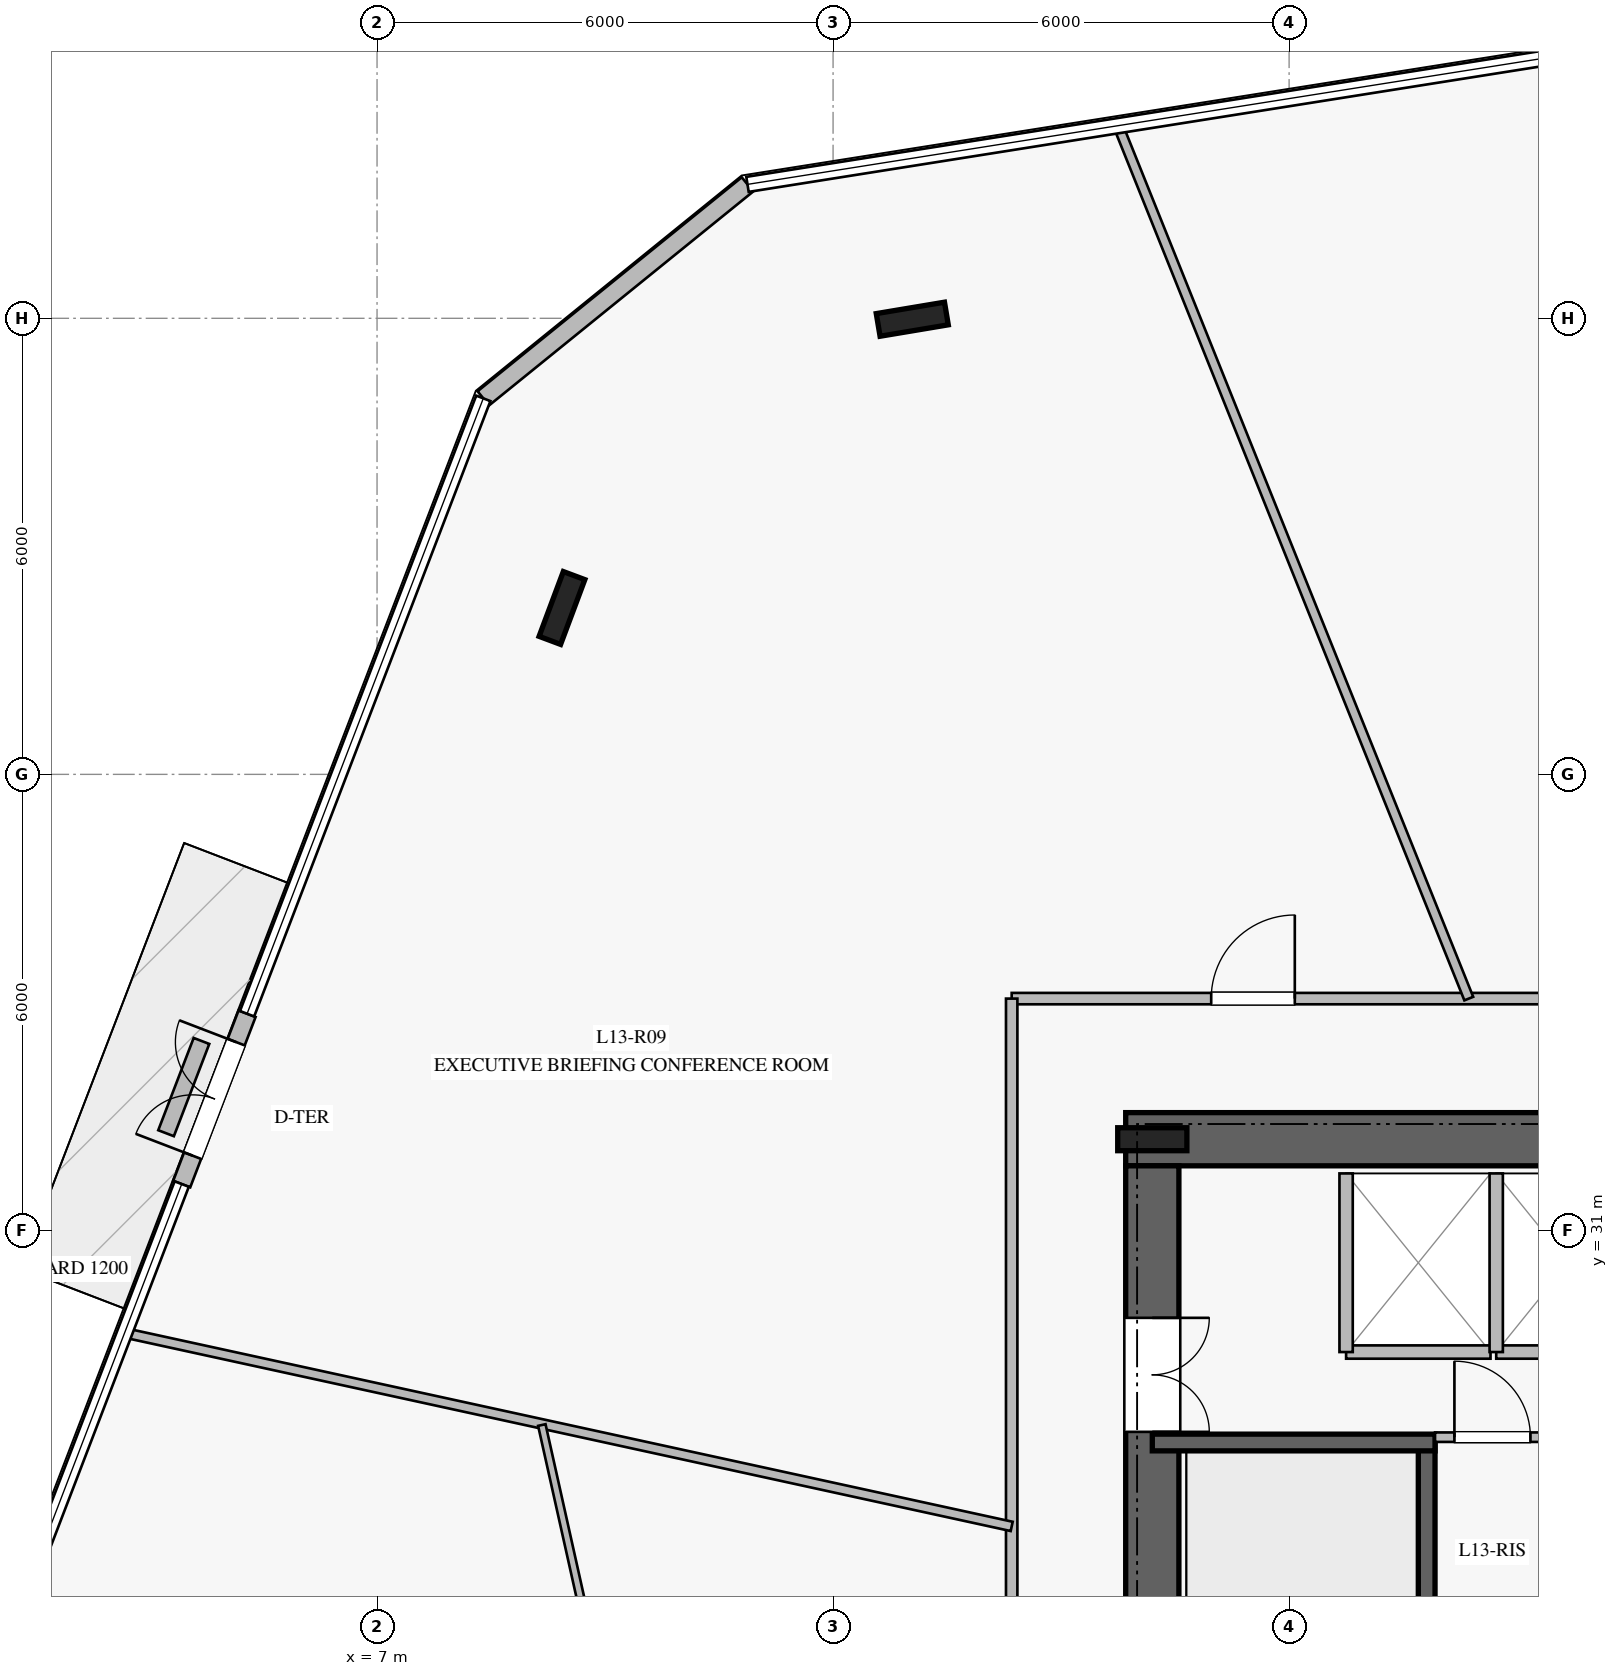
"""IFC4 building model, lengths in metres.
Left out: names, types, materials, properties, quantities, classifications, styles, units other than length and angle.
Written with IfcOpenShell. Run it as: python <this file> out.ifc"""

import sys

from ifc_helpers import new_model, si_unit, direction, frame, frame_2d, origin, origin_2d, place, context, subcontext, project, spatial, rectangle, i_section, extrude, element, fill, save


model = new_model("IFC4")
c1 = context("Model", 3, precision=1e-05, world=origin(), true_north=direction((0.0, 1.0)))
c2 = subcontext(c1, "Body", "Model", "MODEL_VIEW")
j1 = project(units=[si_unit("LENGTHUNIT", "METRE"), si_unit("PLANEANGLEUNIT", "RADIAN")], contexts=[c1])
p1 = place(None, origin())
s1 = spatial("IfcSite", under=j1, at=p1, CompositionType="ELEMENT")
p2 = place(p1, origin())
s2 = spatial("IfcBuilding", under=s1, at=p2, CompositionType="ELEMENT")
p3 = place(p2, frame((0.0, 0.0, 56.0)))
s3 = spatial("IfcBuildingStorey", under=s2, at=p3, CompositionType="ELEMENT", Elevation=56.0)
p4 = place(p3, frame((33.15, 32.2, 0.0), z_axis=(0.0, 0.0, 1.0), x_axis=(-1.0, 0.0, 0.0)))
e1 = element("IfcWall", 1, at=p4, inside=s3, PredefinedType="SHEAR", context=c2, shape_type="SweptSolid", body=[
    extrude(rectangle(XDim=16.3, YDim=0.7, at=frame_2d((8.15, 0.0))), origin(), (0.0, 0.0, 1.0), 3.76),
])
p5 = place(p4, frame((5.1, 0.0, 0.0)))
e2 = element("IfcOpeningElement", 2, at=p5, cuts=e1, PredefinedType="OPENING", context=c2, shape_type="SweptSolid", body=[
    extrude(rectangle(XDim=1.2, YDim=2.25, at=frame_2d((0.6, 1.125))), frame((0.0, 0.36, 0.0), z_axis=(0.0, -1.0, 0.0), x_axis=(1.0, 0.0, 0.0)), (0.0, 0.0, 1.0), 0.72),
])
p6 = place(p3, frame((17.2, 31.85, 0.0), z_axis=(0.0, 0.0, 1.0), x_axis=(0.0, -1.0, 0.0)))
e3 = element("IfcWall", 3, at=p6, inside=s3, PredefinedType="SHEAR", context=c2, shape_type="SweptSolid", body=[
    extrude(rectangle(XDim=13.7, YDim=0.7, at=frame_2d((6.85, 0.0))), origin(), (0.0, 0.0, 1.0), 3.76),
])
p7 = place(p6, frame((2.0, 0.0, 0.0)))
e4 = element("IfcOpeningElement", 4, at=p7, cuts=e3, PredefinedType="OPENING", context=c2, shape_type="SweptSolid", body=[
    extrude(rectangle(XDim=1.5, YDim=2.2, at=frame_2d((0.75, 1.1))), frame((0.0, 0.36, 0.0), z_axis=(0.0, -1.0, 0.0), x_axis=(1.0, 0.0, 0.0)), (0.0, 0.0, 1.0), 0.72),
])
p8 = place(p3, frame((17.2, 32.2, 0.0), z_axis=(0.0, 0.0, 1.0), x_axis=(1.0, 0.0, 0.0)))
e5 = element("IfcColumn", 5, at=p8, inside=s3, PredefinedType="COLUMN", context=c2, shape_type="SweptSolid", body=[
    extrude(i_section(OverallWidth=0.302, OverallDepth=0.91, WebThickness=0.021, FlangeThickness=0.04, at=origin_2d()), origin(), (0.0, 0.0, 1.0), 4.0),
])
p9 = place(p3, frame((20.81, 20.99, 0.0), z_axis=(0.0, 0.0, 1.0), x_axis=(0.0, 1.0, 0.0)))
e6 = element("IfcWall", 6, at=p9, inside=s3, PredefinedType="SOLIDWALL", context=c2, shape_type="SweptSolid", body=[
    extrude(rectangle(XDim=7.22, YDim=0.22, at=frame_2d((3.61, 0.0))), origin(), (0.0, 0.0, 1.0), 3.76),
])
p10 = place(p9, frame((0.18, 0.0, 0.0)))
e7 = element("IfcOpeningElement", 7, at=p10, cuts=e6, PredefinedType="OPENING", context=c2, shape_type="SweptSolid", body=[
    extrude(rectangle(XDim=1.15, YDim=2.2, at=frame_2d((0.575, 1.1))), frame((0.0, 0.12, 0.0), z_axis=(0.0, -1.0, 0.0), x_axis=(1.0, 0.0, 0.0)), (0.0, 0.0, 1.0), 0.24),
])
p11 = place(p3, frame((17.2, 28.21, 0.0), z_axis=(0.0, 0.0, 1.0), x_axis=(1.0, 0.0, 0.0)))
e8 = element("IfcWall", 8, at=p11, inside=s3, PredefinedType="SOLIDWALL", context=c2, shape_type="SweptSolid", body=[
    extrude(rectangle(XDim=3.72, YDim=0.22, at=frame_2d((1.86, 0.0))), origin(), (0.0, 0.0, 1.0), 3.76),
])
for number, where, z_axis, x_axis in (
    (9, (14.042, 42.988, 0.0), (0.0, 0.0, 1.0), (0.986, 0.165, 0.0)),
    (10, (9.433, 39.189, 0.0), (0.0, 0.0, 1.0), (0.35, 0.937, 0.0)),
):
    element("IfcColumn", number, at=place(p3, frame(where, z_axis=z_axis, x_axis=x_axis)), inside=s3, PredefinedType="COLUMN", context=c2, shape_type="SweptSolid", body=[
        extrude(i_section(OverallWidth=0.302, OverallDepth=0.91, WebThickness=0.021, FlangeThickness=0.04, at=origin_2d()), origin(), (0.0, 0.0, 1.0), 4.0),
    ])
p12 = place(p3, frame((11.874, 44.762, 0.0), z_axis=(0.0, 0.0, 1.0), x_axis=(-0.777138088211, -0.629330113574, 0.0)))
e11 = element("IfcWall", 11, at=p12, inside=s3, PredefinedType="STANDARD", context=c2, shape_type="SweptSolid", body=[
    extrude(rectangle(XDim=4.473, YDim=0.24, at=frame_2d((2.236, 0.0))), origin(), (0.0, 0.0, 1.0), 3.76),
])
p13 = place(p3, frame((5.29, 33.851, 0.0), z_axis=(0.0, 0.0, 1.0), x_axis=(-0.35832469106, -0.933597030724, 0.0)))
e12 = element("IfcWall", 12, at=p13, inside=s3, PredefinedType="STANDARD", context=c2, shape_type="SweptSolid", body=[
    extrude(rectangle(XDim=2.4, YDim=0.24, at=frame_2d((1.2, 0.0))), origin(), (0.0, 0.0, 1.0), 3.76),
])
p14 = place(p13, frame((0.4, 0.0, 0.0)))
e13 = element("IfcOpeningElement", 13, at=p14, cuts=e12, PredefinedType="OPENING", context=c2, shape_type="SweptSolid", body=[
    extrude(rectangle(XDim=1.6, YDim=2.25, at=frame_2d((0.8, 1.125))), frame((0.0, 0.13, 0.0), z_axis=(0.0, -1.0, 0.0), x_axis=(1.0, 0.0, 0.0)), (0.0, 0.0, 1.0), 0.26),
])
p15 = place(p3, frame((4.69, 33.493, 0.0), z_axis=(0.0, 0.0, 1.0), x_axis=(-0.358274337513, -0.933616355405, 0.0)))
e14 = element("IfcWall", 14, at=p15, inside=s3, PredefinedType="USERDEFINED", context=c2, shape_type="SweptSolid", body=[
    extrude(rectangle(XDim=1.3, YDim=0.22, at=frame_2d((0.65, 0.0))), origin(), (0.0, 0.0, 1.0), 0.4),
])
p16 = place(p3, frame((20.92, 28.28, 0.0), z_axis=(0.0, 0.0, 1.0), x_axis=(1.0, 0.0, 0.0)))
e15 = element("IfcWall", 15, at=p16, inside=s3, PredefinedType="PARTITIONING", context=c2, shape_type="SweptSolid", body=[
    extrude(rectangle(XDim=3.405, YDim=0.125, at=frame_2d((1.703, 0.0))), origin(), (0.0, 0.0, 1.0), 3.76),
])
p17 = place(p16, frame((0.255, 0.0, 0.0)))
e16 = element("IfcOpeningElement", 16, at=p17, cuts=e15, PredefinedType="OPENING", context=c2, shape_type="SweptSolid", body=[
    extrude(rectangle(XDim=1.0, YDim=2.15, at=frame_2d((0.5, 1.075))), frame((0.0, 0.073, 0.0), z_axis=(0.0, -1.0, 0.0), x_axis=(1.0, 0.0, 0.0)), (0.0, 0.0, 1.0), 0.145),
])
p18 = place(p3, frame((19.75, 29.4, 0.0), z_axis=(0.0, 0.0, 1.0), x_axis=(1.0, 0.0, 0.0)))
e17 = element("IfcWall", 17, at=p18, inside=s3, PredefinedType="PARTITIONING", context=c2, shape_type="SweptSolid", body=[
    extrude(rectangle(XDim=1.9, YDim=0.175, at=frame_2d((0.95, 0.0))), origin(), (0.0, 0.0, 1.0), 3.76),
])
p19 = place(p3, frame((19.75, 29.4, 0.0), z_axis=(0.0, 0.0, 1.0), x_axis=(0.0, 1.0, 0.0)))
e18 = element("IfcWall", 18, at=p19, inside=s3, PredefinedType="PARTITIONING", context=c2, shape_type="SweptSolid", body=[
    extrude(rectangle(XDim=2.35, YDim=0.175, at=frame_2d((1.175, 0.0))), origin(), (0.0, 0.0, 1.0), 3.76),
])
p20 = place(p3, frame((21.725, 29.4, 0.0), z_axis=(0.0, 0.0, 1.0), x_axis=(1.0, 0.0, 0.0)))
e19 = element("IfcWall", 19, at=p20, inside=s3, PredefinedType="PARTITIONING", context=c2, shape_type="SweptSolid", body=[
    extrude(rectangle(XDim=1.9, YDim=0.175, at=frame_2d((0.95, 0.0))), origin(), (0.0, 0.0, 1.0), 3.76),
])
p21 = place(p3, frame((21.725, 29.4, 0.0), z_axis=(0.0, 0.0, 1.0), x_axis=(0.0, 1.0, 0.0)))
e20 = element("IfcWall", 20, at=p21, inside=s3, PredefinedType="PARTITIONING", context=c2, shape_type="SweptSolid", body=[
    extrude(rectangle(XDim=2.35, YDim=0.175, at=frame_2d((1.175, 0.0))), origin(), (0.0, 0.0, 1.0), 3.76),
])
p22 = place(p3, frame((15.35, 34.05, 0.0), z_axis=(0.0, 0.0, 1.0), x_axis=(1.0, 0.0, 0.0)))
e21 = element("IfcWall", 21, at=p22, inside=s3, PredefinedType="PARTITIONING", context=c2, shape_type="SweptSolid", body=[
    extrude(rectangle(XDim=19.3, YDim=0.15, at=frame_2d((9.65, 0.0))), origin(), (0.0, 0.0, 1.0), 3.21),
])
p23 = place(p22, frame((15.92, 0.0, 0.0)))
e22 = element("IfcOpeningElement", 22, at=p23, cuts=e21, PredefinedType="OPENING", context=c2, shape_type="SweptSolid", body=[
    extrude(rectangle(XDim=1.1, YDim=2.2, at=frame_2d((0.55, 1.1))), frame((0.0, 0.085, 0.0), z_axis=(0.0, -1.0, 0.0), x_axis=(1.0, 0.0, 0.0)), (0.0, 0.0, 1.0), 0.17),
])
p24 = place(p22, frame((9.533, 0.0, 0.0)))
e23 = element("IfcOpeningElement", 23, at=p24, cuts=e21, PredefinedType="OPENING", context=c2, shape_type="SweptSolid", body=[
    extrude(rectangle(XDim=1.1, YDim=2.2, at=frame_2d((0.55, 1.1))), frame((0.0, 0.085, 0.0), z_axis=(0.0, -1.0, 0.0), x_axis=(1.0, 0.0, 0.0)), (0.0, 0.0, 1.0), 0.17),
])
p25 = place(p22, frame((2.625, 0.0, 0.0)))
e24 = element("IfcOpeningElement", 24, at=p25, cuts=e21, PredefinedType="OPENING", context=c2, shape_type="SweptSolid", body=[
    extrude(rectangle(XDim=1.1, YDim=2.2, at=frame_2d((0.55, 1.1))), frame((0.0, 0.085, 0.0), z_axis=(0.0, -1.0, 0.0), x_axis=(1.0, 0.0, 0.0)), (0.0, 0.0, 1.0), 0.17),
])
p26 = place(p3, frame((15.35, 15.95, 0.0), z_axis=(0.0, 0.0, 1.0), x_axis=(0.0, 1.0, 0.0)))
e25 = element("IfcWall", 25, at=p26, inside=s3, PredefinedType="PARTITIONING", context=c2, shape_type="SweptSolid", body=[
    extrude(rectangle(XDim=18.1, YDim=0.15, at=frame_2d((9.05, 0.0))), origin(), (0.0, 0.0, 1.0), 3.21),
])
p27 = place(p26, frame((5.617, 0.0, 0.0)))
e26 = element("IfcOpeningElement", 26, at=p27, cuts=e25, PredefinedType="OPENING", context=c2, shape_type="SweptSolid", body=[
    extrude(rectangle(XDim=1.1, YDim=2.2, at=frame_2d((0.55, 1.1))), frame((0.0, 0.085, 0.0), z_axis=(0.0, -1.0, 0.0), x_axis=(1.0, 0.0, 0.0)), (0.0, 0.0, 1.0), 0.17),
])
p28 = place(p3, frame((21.364, 34.05, 0.0), z_axis=(0.0, 0.0, 1.0), x_axis=(-0.372766267376, 0.927925271725, 0.0)))
e27 = element("IfcWall", 27, at=p28, inside=s3, PredefinedType="PARTITIONING", context=c2, shape_type="SweptSolid", body=[
    extrude(rectangle(XDim=12.359, YDim=0.125, at=frame_2d((6.179, 0.0))), origin(), (0.0, 0.0, 1.0), 3.05),
])
p29 = place(p3, frame((15.35, 27.106, 0.0), z_axis=(0.0, 0.0, 1.0), x_axis=(-0.977011110965, 0.213188388642, 0.0)))
e28 = element("IfcWall", 28, at=p29, inside=s3, PredefinedType="PARTITIONING", context=c2, shape_type="SweptSolid", body=[
    extrude(rectangle(XDim=11.928, YDim=0.125, at=frame_2d((5.964, 0.0))), origin(), (0.0, 0.0, 1.0), 3.02),
])
p30 = place(p3, frame((9.168, 28.44, 0.0), z_axis=(0.0, 0.0, 1.0), x_axis=(0.21821254902, -0.975901267265, 0.0)))
e29 = element("IfcWall", 29, at=p30, inside=s3, PredefinedType="MOVABLE", context=c2, shape_type="SweptSolid", body=[
    extrude(rectangle(XDim=14.092, YDim=0.1, at=frame_2d((7.046, 0.0))), origin(), (0.0, 0.0, 1.0), 3.02),
])
p31 = place(p30, frame((6.636, 0.0, 0.0)))
e30 = element("IfcOpeningElement", 30, at=p31, cuts=e29, PredefinedType="OPENING", context=c2, shape_type="SweptSolid", body=[
    extrude(rectangle(XDim=1.0, YDim=2.15, at=frame_2d((0.5, 1.075))), frame((0.0, 0.06, 0.0), z_axis=(0.0, -1.0, 0.0), x_axis=(1.0, 0.0, 0.0)), (0.0, 0.0, 1.0), 0.12),
])
p32 = place(p14, frame((1.6, 0.0, 0.0), z_axis=(0.0, 0.0, 1.0), x_axis=(-1.0, 0.0, 0.0)))
e31 = element("IfcDoor", 31, at=p32, inside=s3, OperationType="DOUBLE_DOOR_SINGLE_SWING", PredefinedType="DOOR", context=c2, shape_type="SweptSolid", body=[
    extrude(rectangle(XDim=1.6, YDim=2.25, at=frame_2d((0.8, 1.125))), frame((0.0, 0.025, 0.0), z_axis=(0.0, -1.0, 0.0), x_axis=(1.0, 0.0, 0.0)), (0.0, 0.0, 1.0), 0.05),
])
fill(e13, e31)
p33 = place(p7, origin())
e32 = element("IfcDoor", 32, at=p33, inside=s3, OperationType="DOUBLE_DOOR_SINGLE_SWING", PredefinedType="DOOR", context=c2, shape_type="SweptSolid", body=[
    extrude(rectangle(XDim=1.5, YDim=2.2, at=frame_2d((0.75, 1.1))), frame((0.0, 0.025, 0.0), z_axis=(0.0, -1.0, 0.0), x_axis=(1.0, 0.0, 0.0)), (0.0, 0.0, 1.0), 0.05),
])
fill(e4, e32)
p34 = place(p17, origin())
e33 = element("IfcDoor", 33, at=p34, inside=s3, OperationType="SINGLE_SWING_LEFT", PredefinedType="DOOR", context=c2, shape_type="SweptSolid", body=[
    extrude(rectangle(XDim=1.0, YDim=2.15, at=frame_2d((0.5, 1.075))), frame((0.0, 0.025, 0.0), z_axis=(0.0, -1.0, 0.0), x_axis=(1.0, 0.0, 0.0)), (0.0, 0.0, 1.0), 0.05),
])
fill(e16, e33)
p35 = place(p25, origin())
e34 = element("IfcDoor", 34, at=p35, inside=s3, OperationType="SINGLE_SWING_RIGHT", PredefinedType="DOOR", context=c2, shape_type="SweptSolid", body=[
    extrude(rectangle(XDim=1.1, YDim=2.2, at=frame_2d((0.55, 1.1))), frame((0.0, 0.025, 0.0), z_axis=(0.0, -1.0, 0.0), x_axis=(1.0, 0.0, 0.0)), (0.0, 0.0, 1.0), 0.05),
])
fill(e24, e34)
save(model, sys.argv[1])
